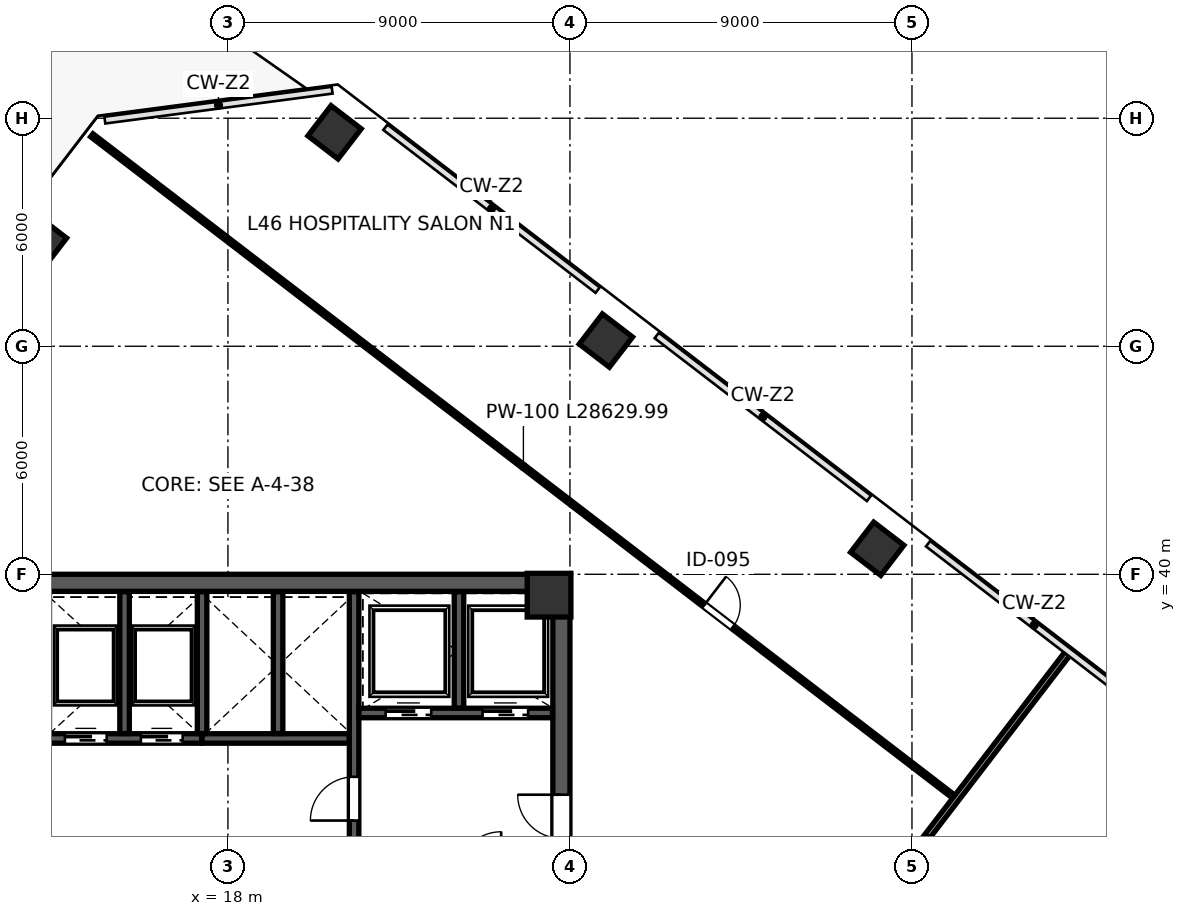
"""IFC4 building model, lengths in metres.
Left out: names, types, materials, properties, quantities, classifications, styles, units other than length and angle.
Written with IfcOpenShell. Run it as: python <this file> out.ifc"""

import sys

from ifc_helpers import new_model, si_unit, direction, frame, frame_2d, origin, origin_2d, place, context, subcontext, project, spatial, rectangle, extrude, source, transform, mapped, element, fill, save


model = new_model("IFC4")
c1 = context("Model", 3, precision=1e-05, world=origin(), true_north=direction((0.0, 1.0)))
c2 = subcontext(c1, "Body", "Model", "MODEL_VIEW")
j1 = project(units=[si_unit("LENGTHUNIT", "METRE"), si_unit("PLANEANGLEUNIT", "RADIAN")], contexts=[c1])
p1 = place(None, origin())
s1 = spatial("IfcSite", under=j1, at=p1, CompositionType="ELEMENT")
p2 = place(p1, origin())
s2 = spatial("IfcBuilding", under=s1, at=p2, CompositionType="ELEMENT")
p3 = place(p2, frame((0.0, 0.0, 204.4)))
s3 = spatial("IfcBuildingStorey", under=s2, at=p3, CompositionType="ELEMENT", Elevation=204.4)
m1 = source(origin(), c2, "Body", "SweptSolid", [
    extrude(rectangle(XDim=1.15, YDim=1.15, at=origin_2d()), origin(), (0.0, 0.0, 1.0), 5.399),
])
p4 = place(p3, frame((26.45, 39.45, 0.001), z_axis=(0.0, 0.0, 1.0), x_axis=(1.0, 0.0, 0.0)))
e1 = element("IfcColumn", 1, at=p4, inside=s3, PredefinedType="COLUMN", context=c2, shape_type="MappedRepresentation", body=[
    mapped(m1, transform((0.0, 0.0, 0.0), scale=1.0)),
])
m2 = source(origin(), c2, "Body", "SweptSolid", [
    extrude(rectangle(XDim=1.0, YDim=1.0, at=origin_2d()), origin(), (0.0, 0.0, 1.0), 5.399),
])
for number, where, z_axis, x_axis in (
    (2, (20.806, 51.629, 0.001), (0.0, 0.0, 1.0), (-0.793, 0.609, 0.0)),
    (3, (27.946, 46.15, 0.001), (0.0, 0.0, 1.0), (-0.793, 0.609, 0.0)),
    (4, (35.086, 40.671, 0.001), (0.0, 0.0, 1.0), (-0.793, 0.609, 0.0)),
):
    element("IfcColumn", number, at=place(p3, frame(where, z_axis=z_axis, x_axis=x_axis)), inside=s3, PredefinedType="COLUMN", context=c2, shape_type="MappedRepresentation", body=[
        mapped(m2, transform((0.0, 0.0, 0.0), scale=1.0)),
    ])
m3 = source(origin(), c2, "Body", "SweptSolid", [
    extrude(rectangle(XDim=0.9, YDim=1.3, at=origin_2d()), origin(), (0.0, 0.0, 1.0), 5.399),
])
p5 = place(p3, frame((13.002, 48.604, 0.001), z_axis=(0.0, 0.0, 1.0), x_axis=(-0.793353340291, 0.608761429009, 0.0)))
e5 = element("IfcColumn", 5, at=p5, inside=s3, PredefinedType="PILASTER", context=c2, shape_type="MappedRepresentation", body=[
    mapped(m3, transform((0.0, 0.0, 0.0), scale=1.0)),
])
p6 = place(p3, frame((26.775, 24.45, 0.0), z_axis=(0.0, 0.0, 1.0), x_axis=(0.0, 1.0, 0.0)))
e6 = element("IfcWall", 6, at=p6, inside=s3, PredefinedType="SHEAR", context=c2, shape_type="SweptSolid", body=[
    extrude(rectangle(XDim=15.1, YDim=0.45, at=frame_2d((7.55, 0.0))), origin(), (0.0, 0.0, 1.0), 5.12),
])
p7 = place(p6, frame((8.6, 0.0, 0.0)))
e7 = element("IfcOpeningElement", 7, at=p7, cuts=e6, PredefinedType="OPENING", context=c2, shape_type="SweptSolid", body=[
    extrude(rectangle(XDim=1.15, YDim=2.2, at=frame_2d((0.575, 1.1))), frame((0.0, 0.235, 0.0), z_axis=(0.0, -1.0, 0.0), x_axis=(1.0, 0.0, 0.0)), (0.0, 0.0, 1.0), 0.47),
])
p8 = place(p3, frame((9.0, 39.775, 0.0), z_axis=(0.0, 0.0, 1.0), x_axis=(1.0, 0.0, 0.0)))
e8 = element("IfcWall", 8, at=p8, inside=s3, PredefinedType="SHEAR", context=c2, shape_type="SweptSolid", body=[
    extrude(rectangle(XDim=18.0, YDim=0.45, at=frame_2d((9.0, 0.0))), origin(), (0.0, 0.0, 1.0), 5.12),
])
p9 = place(p3, frame((21.32, 32.12, 0.0), z_axis=(0.0, 0.0, 1.0), x_axis=(0.0, 1.0, 0.0)))
e9 = element("IfcWall", 9, at=p9, inside=s3, PredefinedType="SHEAR", context=c2, shape_type="SweptSolid", body=[
    extrude(rectangle(XDim=7.42, YDim=0.25, at=frame_2d((3.71, 0.0))), origin(), (0.0, 0.0, 1.0), 5.12),
])
p10 = place(p9, frame((1.4, 0.0, 0.0)))
e10 = element("IfcOpeningElement", 10, at=p10, cuts=e9, PredefinedType="OPENING", context=c2, shape_type="SweptSolid", body=[
    extrude(rectangle(XDim=1.15, YDim=2.2, at=frame_2d((0.575, 1.1))), frame((0.0, 0.135, 0.0), z_axis=(0.0, -1.0, 0.0), x_axis=(1.0, 0.0, 0.0)), (0.0, 0.0, 1.0), 0.27),
])
p11 = place(p3, frame((21.45, 36.35, 0.0), z_axis=(0.0, 0.0, 1.0), x_axis=(1.0, 0.0, 0.0)))
e11 = element("IfcWall", 11, at=p11, inside=s3, PredefinedType="SHEAR", context=c2, shape_type="SweptSolid", body=[
    extrude(rectangle(XDim=5.09, YDim=0.25, at=frame_2d((2.545, 0.0))), origin(), (0.0, 0.0, 1.0), 5.12),
])
p12 = place(p11, frame((0.7, 0.0, 0.0)))
e12 = element("IfcOpeningElement", 12, at=p12, cuts=e11, PredefinedType="OPENING", context=c2, shape_type="SweptSolid", body=[
    extrude(rectangle(XDim=1.2, YDim=2.2, at=frame_2d((0.6, 1.1))), frame((0.0, 0.135, 0.0), z_axis=(0.0, -1.0, 0.0), x_axis=(1.0, 0.0, 0.0)), (0.0, 0.0, 1.0), 0.27),
])
p13 = place(p11, frame((3.25, 0.0, 0.0)))
e13 = element("IfcOpeningElement", 13, at=p13, cuts=e11, PredefinedType="OPENING", context=c2, shape_type="SweptSolid", body=[
    extrude(rectangle(XDim=1.2, YDim=2.2, at=frame_2d((0.6, 1.1))), frame((0.0, 0.135, 0.0), z_axis=(0.0, -1.0, 0.0), x_axis=(1.0, 0.0, 0.0)), (0.0, 0.0, 1.0), 0.27),
])
p14 = place(p3, frame((24.08, 36.48, 0.0), z_axis=(0.0, 0.0, 1.0), x_axis=(0.0, 1.0, 0.0)))
e14 = element("IfcWall", 14, at=p14, inside=s3, PredefinedType="SHEAR", context=c2, shape_type="SweptSolid", body=[
    extrude(rectangle(XDim=3.06, YDim=0.25, at=frame_2d((1.53, 0.0))), origin(), (0.0, 0.0, 1.0), 5.12),
])
p15 = place(p3, frame((13.06, 35.68, 0.0), z_axis=(0.0, 0.0, 1.0), x_axis=(1.0, 0.0, 0.0)))
e15 = element("IfcWall", 15, at=p15, inside=s3, PredefinedType="SHEAR", context=c2, shape_type="SweptSolid", body=[
    extrude(rectangle(XDim=4.25, YDim=0.25, at=frame_2d((2.125, 0.0))), origin(), (0.0, 0.0, 1.0), 5.12),
])
p16 = place(p15, frame((0.65, 0.0, 0.0)))
e16 = element("IfcOpeningElement", 16, at=p16, cuts=e15, PredefinedType="OPENING", context=c2, shape_type="SweptSolid", body=[
    extrude(rectangle(XDim=1.1, YDim=2.2, at=frame_2d((0.55, 1.1))), frame((0.0, 0.135, 0.0), z_axis=(0.0, -1.0, 0.0), x_axis=(1.0, 0.0, 0.0)), (0.0, 0.0, 1.0), 0.27),
])
p17 = place(p15, frame((2.65, 0.0, 0.0)))
e17 = element("IfcOpeningElement", 17, at=p17, cuts=e15, PredefinedType="OPENING", context=c2, shape_type="SweptSolid", body=[
    extrude(rectangle(XDim=1.1, YDim=2.2, at=frame_2d((0.55, 1.1))), frame((0.0, 0.135, 0.0), z_axis=(0.0, -1.0, 0.0), x_axis=(1.0, 0.0, 0.0)), (0.0, 0.0, 1.0), 0.27),
])
p18 = place(p3, frame((15.28, 35.81, 0.0), z_axis=(0.0, 0.0, 1.0), x_axis=(0.0, 1.0, 0.0)))
e18 = element("IfcWall", 18, at=p18, inside=s3, PredefinedType="SHEAR", context=c2, shape_type="SweptSolid", body=[
    extrude(rectangle(XDim=3.73, YDim=0.25, at=frame_2d((1.865, 0.0))), origin(), (0.0, 0.0, 1.0), 5.12),
])
p19 = place(p3, frame((17.32, 35.68, 0.0), z_axis=(0.0, 0.0, 1.0), x_axis=(1.0, 0.0, 0.0)))
e19 = element("IfcWall", 19, at=p19, inside=s3, PredefinedType="SHEAR", context=c2, shape_type="SweptSolid", body=[
    extrude(rectangle(XDim=3.87, YDim=0.25, at=frame_2d((1.935, 0.0))), origin(), (0.0, 0.0, 1.0), 5.12),
])
for number, where, z_axis, x_axis in (
    (20, (17.32, 35.81, 0.0), (0.0, 0.0, 1.0), (0.0, 1.0, 0.0)),
    (21, (19.32, 35.81, 0.0), (0.0, 0.0, 1.0), (0.0, 1.0, 0.0)),
):
    element("IfcWall", number, at=place(p3, frame(where, z_axis=z_axis, x_axis=x_axis)), inside=s3, PredefinedType="SHEAR", context=c2, shape_type="SweptSolid", body=[
        extrude(rectangle(XDim=3.73, YDim=0.25, at=frame_2d((1.865, 0.0))), origin(), (0.0, 0.0, 1.0), 5.12),
    ])
p20 = place(p3, frame((14.418, 51.551, 0.0), z_axis=(0.0, 0.0, 1.0), x_axis=(0.793357597302, -0.608755881124, 0.0)))
e22 = element("IfcWall", 22, at=p20, inside=s3, PredefinedType="PARTITIONING", context=c2, shape_type="SweptSolid", body=[
    extrude(rectangle(XDim=28.63, YDim=0.1, at=frame_2d((14.315, 0.0))), origin(), (0.0, 0.0, 1.0), 5.12),
])
p21 = place(p20, frame((20.31, 0.0, 0.0)))
e23 = element("IfcOpeningElement", 23, at=p21, cuts=e22, PredefinedType="OPENING", context=c2, shape_type="SweptSolid", body=[
    extrude(rectangle(XDim=0.95, YDim=2.15, at=frame_2d((0.475, 1.075))), frame((0.0, 0.06, 0.0), z_axis=(0.0, -1.0, 0.0), x_axis=(1.0, 0.0, 0.0)), (0.0, 0.0, 1.0), 0.12),
])
p22 = place(p3, frame((32.647, 28.211, 0.0), z_axis=(0.0, 0.0, 1.0), x_axis=(0.608743464117, 0.793367124914, 0.0)))
e24 = element("IfcWall", 24, at=p22, inside=s3, PredefinedType="PARTITIONING", context=c2, shape_type="SweptSolid", body=[
    extrude(rectangle(XDim=12.24, YDim=0.16, at=frame_2d((6.12, 0.0))), origin(), (0.0, 0.0, 1.0), 4.355),
])
m4 = source(origin(), c2, "Body", "SweptSolid", [
    extrude(rectangle(XDim=1.15, YDim=2.2, at=frame_2d((0.575, 1.1))), frame((0.0, 0.025, 0.0), z_axis=(0.0, -1.0, 0.0), x_axis=(1.0, 0.0, 0.0)), (0.0, 0.0, 1.0), 0.05),
])
p23 = place(p10, origin())
e25 = element("IfcDoor", 25, at=p23, inside=s3, OperationType="SINGLE_SWING_LEFT", PredefinedType="DOOR", context=c2, shape_type="MappedRepresentation", body=[
    mapped(m4, transform((0.0, 0.0, 0.0), scale=1.0)),
])
fill(e10, e25)
p24 = place(p7, origin())
e26 = element("IfcDoor", 26, at=p24, inside=s3, OperationType="SINGLE_SWING_RIGHT", PredefinedType="DOOR", context=c2, shape_type="MappedRepresentation", body=[
    mapped(m4, transform((0.0, 0.0, 0.0), scale=1.0)),
])
fill(e7, e26)
m5 = source(origin(), c2, "Body", "SweptSolid", [
    extrude(rectangle(XDim=1.1, YDim=2.2, at=frame_2d((0.55, 1.1))), frame((0.0, 0.025, 0.0), z_axis=(0.0, -1.0, 0.0), x_axis=(1.0, 0.0, 0.0)), (0.0, 0.0, 1.0), 0.05),
])
p25 = place(p16, origin())
e27 = element("IfcDoor", 27, at=p25, inside=s3, OperationType="SLIDING_TO_LEFT", PredefinedType="DOOR", context=c2, shape_type="MappedRepresentation", body=[
    mapped(m5, transform((0.0, 0.0, 0.0), scale=1.0)),
])
fill(e16, e27)
p26 = place(p17, origin())
e28 = element("IfcDoor", 28, at=p26, inside=s3, OperationType="SLIDING_TO_RIGHT", PredefinedType="DOOR", context=c2, shape_type="MappedRepresentation", body=[
    mapped(m5, transform((0.0, 0.0, 0.0), scale=1.0)),
])
fill(e17, e28)
m6 = source(origin(), c2, "Body", "SweptSolid", [
    extrude(rectangle(XDim=1.2, YDim=2.2, at=frame_2d((0.6, 1.1))), frame((0.0, 0.025, 0.0), z_axis=(0.0, -1.0, 0.0), x_axis=(1.0, 0.0, 0.0)), (0.0, 0.0, 1.0), 0.05),
])
p27 = place(p12, origin())
e29 = element("IfcDoor", 29, at=p27, inside=s3, OperationType="SLIDING_TO_LEFT", PredefinedType="DOOR", context=c2, shape_type="MappedRepresentation", body=[
    mapped(m6, transform((0.0, 0.0, 0.0), scale=1.0)),
])
fill(e12, e29)
p28 = place(p13, origin())
e30 = element("IfcDoor", 30, at=p28, inside=s3, OperationType="SLIDING_TO_RIGHT", PredefinedType="DOOR", context=c2, shape_type="MappedRepresentation", body=[
    mapped(m6, transform((0.0, 0.0, 0.0), scale=1.0)),
])
fill(e13, e30)
m7 = source(origin(), c2, "Body", "SweptSolid", [
    extrude(rectangle(XDim=0.95, YDim=2.15, at=frame_2d((0.475, 1.075))), frame((0.0, 0.025, 0.0), z_axis=(0.0, -1.0, 0.0), x_axis=(1.0, 0.0, 0.0)), (0.0, 0.0, 1.0), 0.05),
])
p29 = place(p21, origin())
e31 = element("IfcDoor", 31, at=p29, inside=s3, OperationType="SINGLE_SWING_LEFT", PredefinedType="DOOR", context=c2, shape_type="MappedRepresentation", body=[
    mapped(m7, transform((0.0, 0.0, 0.0), scale=1.0)),
])
fill(e23, e31)
save(model, sys.argv[1])
